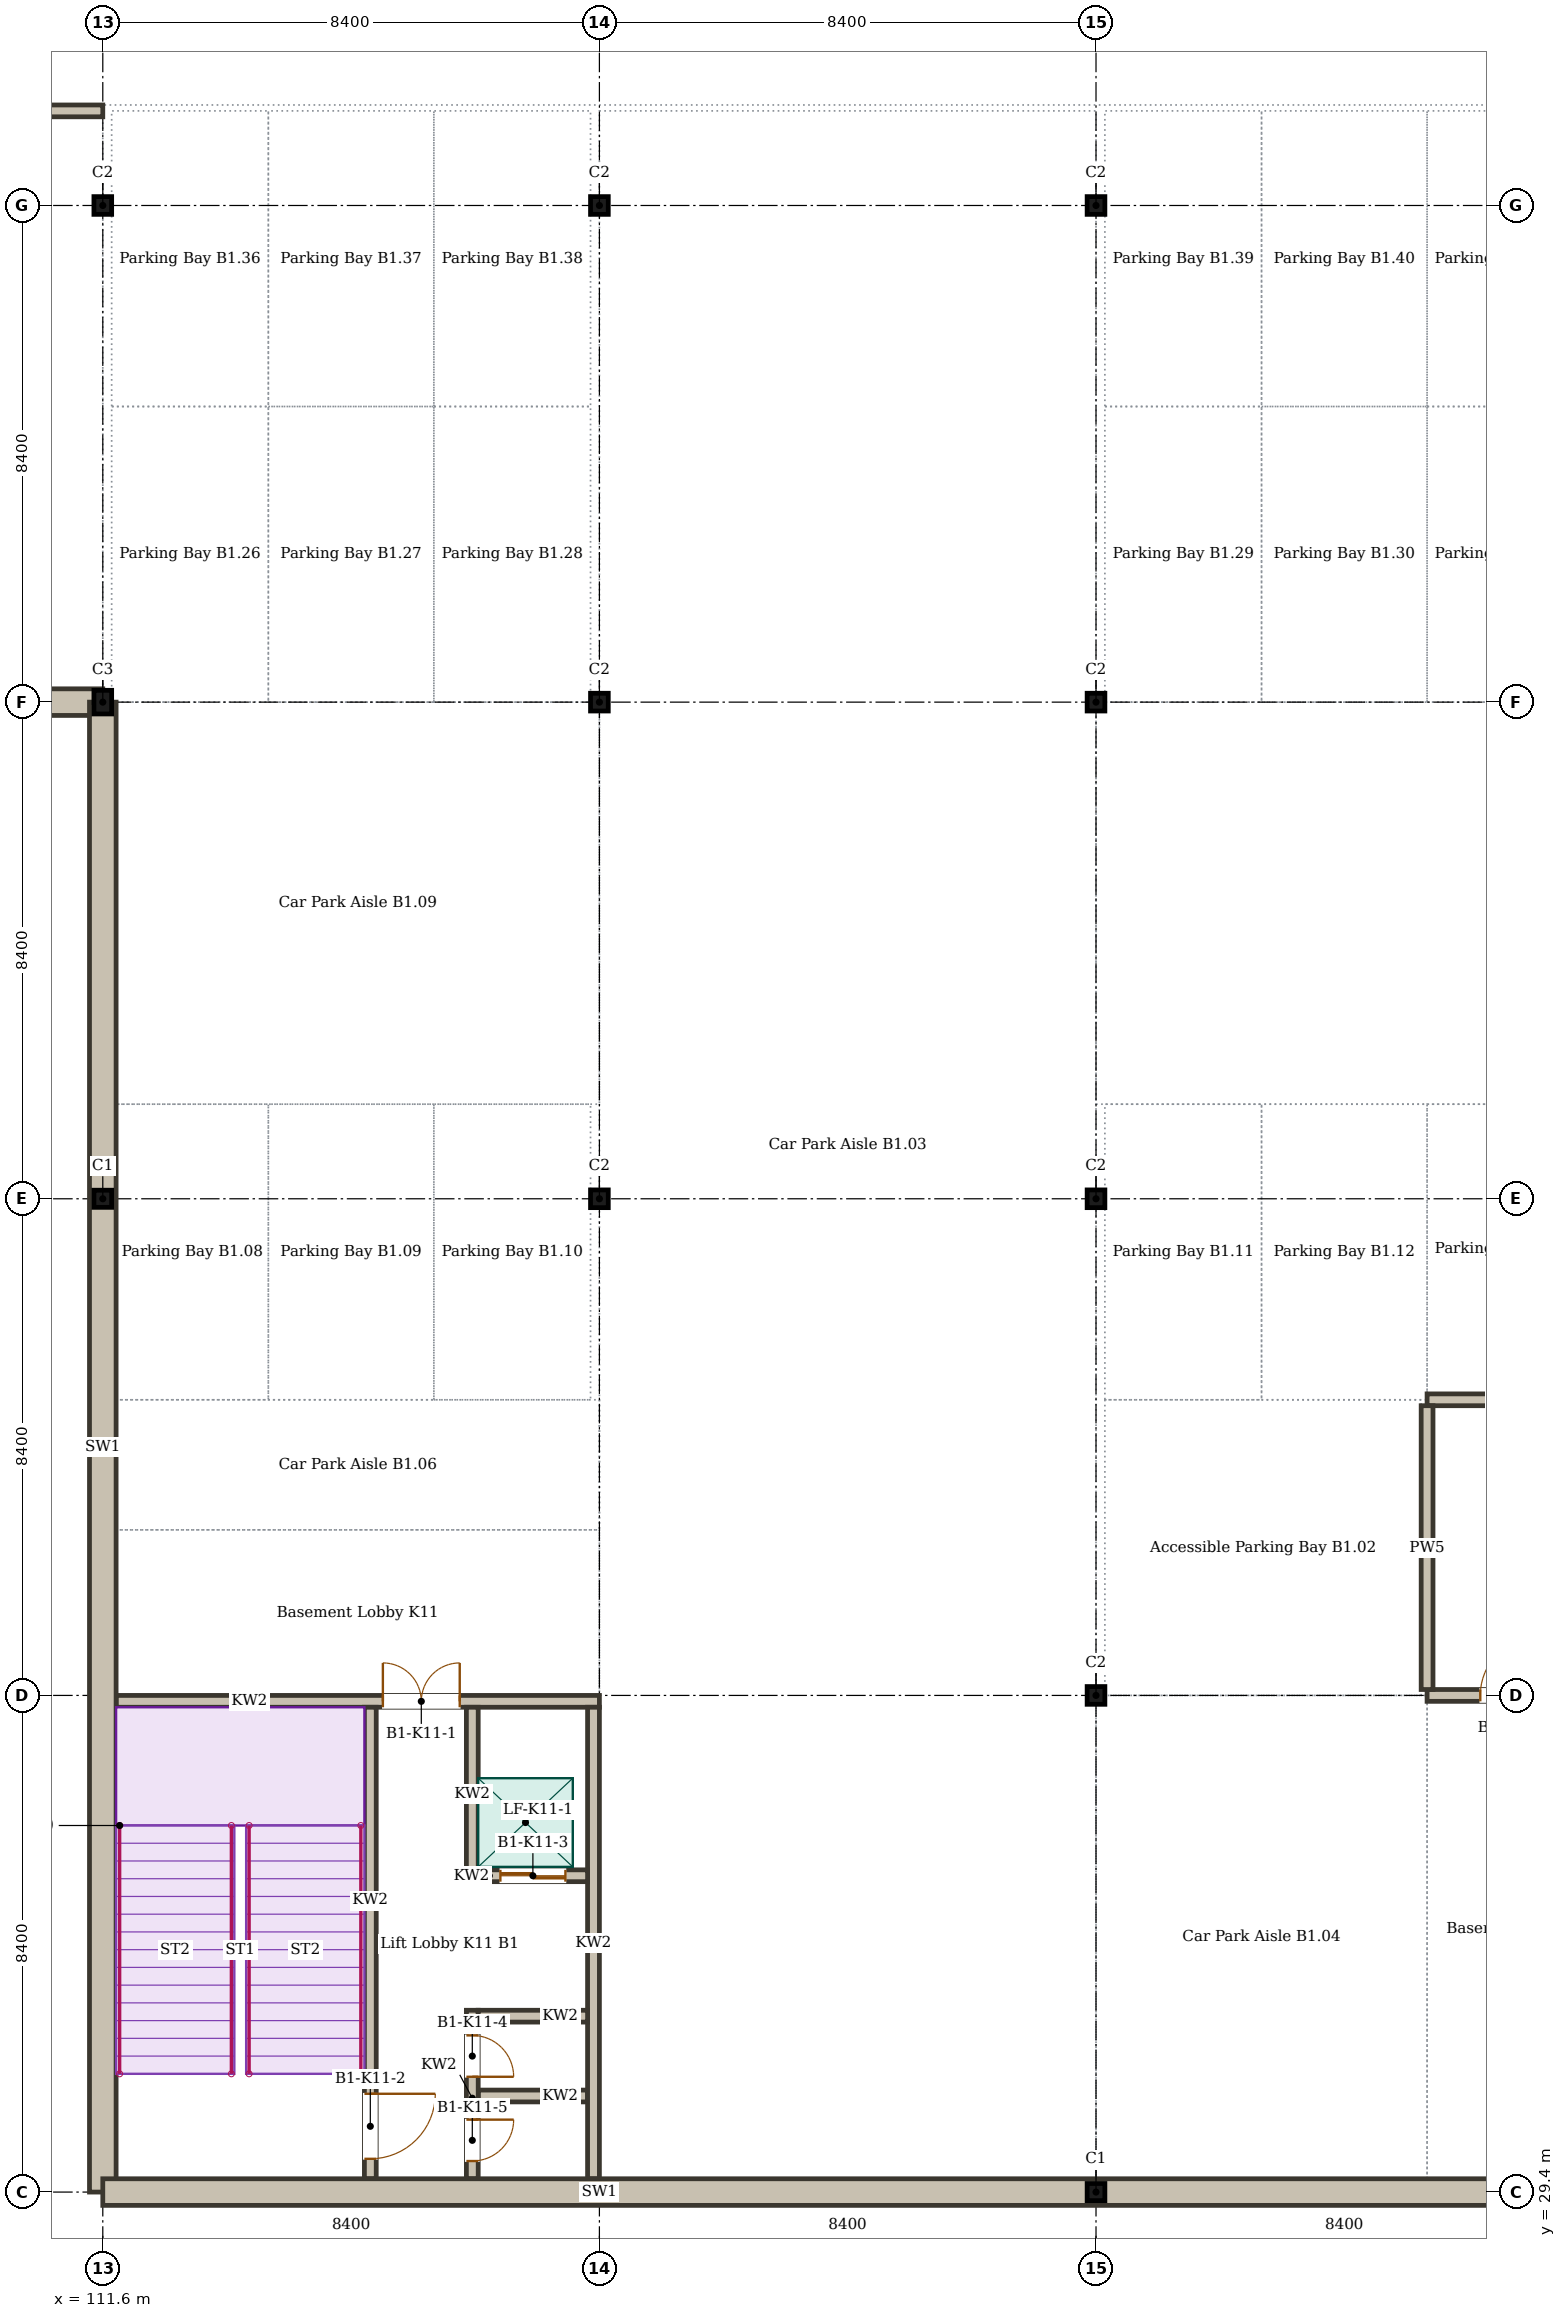
"""IFC4 building model, lengths in metres.
Left out: names, types, materials, properties, quantities, classifications, styles, units other than length and angle.
Written with IfcOpenShell. Run it as: python <this file> out.ifc"""

import sys

from ifc_helpers import new_model, si_unit, direction, frame, frame_2d, origin, origin_2d, place, context, subcontext, project, spatial, rectangle, i_section, extrude, element, fill, save


model = new_model("IFC4")
c1 = context("Model", 3, precision=1e-05, world=origin(), true_north=direction((0.0, 1.0)))
c2 = subcontext(c1, "Body", "Model", "MODEL_VIEW")
j1 = project(units=[si_unit("LENGTHUNIT", "METRE"), si_unit("PLANEANGLEUNIT", "RADIAN")], contexts=[c1])
p1 = place(None, origin())
s1 = spatial("IfcSite", under=j1, at=p1, CompositionType="ELEMENT")
p2 = place(p1, origin())
s2 = spatial("IfcBuilding", under=s1, at=p2, CompositionType="ELEMENT")
p3 = place(p2, frame((0.0, 0.0, -4.5)))
s3 = spatial("IfcBuildingStorey", under=s2, at=p3, CompositionType="ELEMENT", Elevation=-4.5)
p4 = place(p3, frame((128.4, 29.4, 0.0), z_axis=(0.0, 0.0, 1.0), x_axis=(1.0, 0.0, 0.0)))
e1 = element("IfcColumn", 1, at=p4, inside=s3, PredefinedType="COLUMN", context=c2, shape_type="SweptSolid", body=[
    extrude(i_section(OverallWidth=0.3, OverallDepth=0.29, WebThickness=0.009, FlangeThickness=0.014, FilletRadius=0.027, at=origin_2d()), origin(), (0.0, 0.0, 1.0), 4.5),
])
p5 = place(p3, frame((128.4, 37.8, 0.0), z_axis=(0.0, 0.0, 1.0), x_axis=(1.0, 0.0, 0.0)))
e2 = element("IfcColumn", 2, at=p5, inside=s3, PredefinedType="COLUMN", context=c2, shape_type="SweptSolid", body=[
    extrude(i_section(OverallWidth=0.3, OverallDepth=0.3, WebThickness=0.011, FlangeThickness=0.019, FilletRadius=0.027, at=origin_2d()), origin(), (0.0, 0.0, 1.0), 4.5),
])
p6 = place(p3, frame((111.6, 46.2, 0.0), z_axis=(0.0, 0.0, 1.0), x_axis=(1.0, 0.0, 0.0)))
e3 = element("IfcColumn", 3, at=p6, inside=s3, PredefinedType="COLUMN", context=c2, shape_type="SweptSolid", body=[
    extrude(i_section(OverallWidth=0.3, OverallDepth=0.29, WebThickness=0.009, FlangeThickness=0.014, FilletRadius=0.027, at=origin_2d()), origin(), (0.0, 0.0, 1.0), 4.5),
])
for number, where, z_axis, x_axis in (
    (4, (120.0, 46.2, 0.0), (0.0, 0.0, 1.0), (1.0, 0.0, 0.0)),
    (5, (128.4, 46.2, 0.0), (0.0, 0.0, 1.0), (1.0, 0.0, 0.0)),
):
    element("IfcColumn", number, at=place(p3, frame(where, z_axis=z_axis, x_axis=x_axis)), inside=s3, PredefinedType="COLUMN", context=c2, shape_type="SweptSolid", body=[
        extrude(i_section(OverallWidth=0.3, OverallDepth=0.3, WebThickness=0.011, FlangeThickness=0.019, FilletRadius=0.027, at=origin_2d()), origin(), (0.0, 0.0, 1.0), 4.5),
    ])
p7 = place(p3, frame((111.6, 54.6, 0.0), z_axis=(0.0, 0.0, 1.0), x_axis=(1.0, 0.0, 0.0)))
e6 = element("IfcColumn", 6, at=p7, inside=s3, PredefinedType="COLUMN", context=c2, shape_type="SweptSolid", body=[
    extrude(i_section(OverallWidth=0.3, OverallDepth=0.4, WebThickness=0.013, FlangeThickness=0.024, FilletRadius=0.027, at=origin_2d()), origin(), (0.0, 0.0, 1.0), 4.5),
])
for number, where, z_axis, x_axis in (
    (7, (120.0, 54.6, 0.0), (0.0, 0.0, 1.0), (1.0, 0.0, 0.0)),
    (8, (128.4, 54.6, 0.0), (0.0, 0.0, 1.0), (1.0, 0.0, 0.0)),
    (9, (111.6, 63.0, 0.0), (0.0, 0.0, 1.0), (1.0, 0.0, 0.0)),
    (10, (120.0, 63.0, 0.0), (0.0, 0.0, 1.0), (1.0, 0.0, 0.0)),
    (11, (128.4, 63.0, 0.0), (0.0, 0.0, 1.0), (1.0, 0.0, 0.0)),
):
    element("IfcColumn", number, at=place(p3, frame(where, z_axis=z_axis, x_axis=x_axis)), inside=s3, PredefinedType="COLUMN", context=c2, shape_type="SweptSolid", body=[
        extrude(i_section(OverallWidth=0.3, OverallDepth=0.3, WebThickness=0.011, FlangeThickness=0.019, FilletRadius=0.027, at=origin_2d()), origin(), (0.0, 0.0, 1.0), 4.5),
    ])
p8 = place(p3, frame((44.4, 54.6, 0.0), z_axis=(0.0, 0.0, 1.0), x_axis=(1.0, 0.0, 0.0)))
e12 = element("IfcWall", 12, at=p8, inside=s3, PredefinedType="SOLIDWALL", context=c2, shape_type="SweptSolid", body=[
    extrude(rectangle(XDim=67.2, YDim=0.45, at=frame_2d((33.6, 0.0))), origin(), (0.0, 0.0, 1.0), 4.35),
])
p9 = place(p3, frame((111.6, 54.6, 0.0), z_axis=(0.0, 0.0, 1.0), x_axis=(0.0, -1.0, 0.0)))
e13 = element("IfcWall", 13, at=p9, inside=s3, PredefinedType="SOLIDWALL", context=c2, shape_type="SweptSolid", body=[
    extrude(rectangle(XDim=25.2, YDim=0.45, at=frame_2d((12.6, 0.0))), origin(), (0.0, 0.0, 1.0), 4.35),
])
p10 = place(p3, frame((111.6, 29.4, 0.0), z_axis=(0.0, 0.0, 1.0), x_axis=(1.0, 0.0, 0.0)))
e14 = element("IfcWall", 14, at=p10, inside=s3, PredefinedType="SOLIDWALL", context=c2, shape_type="SweptSolid", body=[
    extrude(rectangle(XDim=33.6, YDim=0.45, at=frame_2d((16.8, 0.0))), origin(), (0.0, 0.0, 1.0), 4.35),
])
p11 = place(p3, frame((134.0, 37.8, 0.0), z_axis=(0.0, 0.0, 1.0), x_axis=(1.0, 0.0, 0.0)))
e15 = element("IfcWall", 15, at=p11, inside=s3, PredefinedType="SOLIDWALL", context=c2, shape_type="SweptSolid", body=[
    extrude(rectangle(XDim=2.8, YDim=0.2, at=frame_2d((1.4, 0.0))), origin(), (0.0, 0.0, 1.0), 3.8),
])
p12 = place(p11, frame((0.9, 0.0, 0.0)))
e16 = element("IfcOpeningElement", 16, at=p12, cuts=e15, PredefinedType="OPENING", context=c2, shape_type="SweptSolid", body=[
    extrude(rectangle(XDim=1.0, YDim=2.1, at=frame_2d((0.5, 1.05))), frame((0.0, 0.11, 0.0), z_axis=(0.0, -1.0, 0.0), x_axis=(1.0, 0.0, 0.0)), (0.0, 0.0, 1.0), 0.22),
])
p13 = place(p3, frame((134.0, 42.8, 0.0), z_axis=(0.0, 0.0, 1.0), x_axis=(1.0, 0.0, 0.0)))
e17 = element("IfcWall", 17, at=p13, inside=s3, PredefinedType="SOLIDWALL", context=c2, shape_type="SweptSolid", body=[
    extrude(rectangle(XDim=2.65, YDim=0.2, at=frame_2d((1.325, 0.0))), origin(), (0.0, 0.0, 1.0), 3.95),
])
p14 = place(p3, frame((44.4, 64.6, 0.0), z_axis=(0.0, 0.0, 1.0), x_axis=(1.0, 0.0, 0.0)))
e18 = element("IfcWall", 18, at=p14, inside=s3, PredefinedType="SOLIDWALL", context=c2, shape_type="SweptSolid", body=[
    extrude(rectangle(XDim=67.2, YDim=0.2, at=frame_2d((33.6, 0.0))), origin(), (0.0, 0.0, 1.0), 3.8),
])
p15 = place(p14, frame((3.2, 0.0, 0.0)))
e19 = element("IfcOpeningElement", 19, at=p15, cuts=e18, PredefinedType="OPENING", context=c2, shape_type="SweptSolid", body=[
    extrude(rectangle(XDim=1.0, YDim=2.1, at=frame_2d((0.5, 1.05))), frame((0.0, 0.11, 0.0), z_axis=(0.0, -1.0, 0.0), x_axis=(1.0, 0.0, 0.0)), (0.0, 0.0, 1.0), 0.22),
])
p16 = place(p14, frame((21.0, 0.0, 0.0)))
e20 = element("IfcOpeningElement", 20, at=p16, cuts=e18, PredefinedType="OPENING", context=c2, shape_type="SweptSolid", body=[
    extrude(rectangle(XDim=1.0, YDim=2.1, at=frame_2d((0.5, 1.05))), frame((0.0, 0.11, 0.0), z_axis=(0.0, -1.0, 0.0), x_axis=(1.0, 0.0, 0.0)), (0.0, 0.0, 1.0), 0.22),
])
p17 = place(p14, frame((28.9, 0.0, 0.0)))
e21 = element("IfcOpeningElement", 21, at=p17, cuts=e18, PredefinedType="OPENING", context=c2, shape_type="SweptSolid", body=[
    extrude(rectangle(XDim=1.0, YDim=2.1, at=frame_2d((0.5, 1.05))), frame((0.0, 0.11, 0.0), z_axis=(0.0, -1.0, 0.0), x_axis=(1.0, 0.0, 0.0)), (0.0, 0.0, 1.0), 0.22),
])
p18 = place(p14, frame((36.8, 0.0, 0.0)))
e22 = element("IfcOpeningElement", 22, at=p18, cuts=e18, PredefinedType="OPENING", context=c2, shape_type="SweptSolid", body=[
    extrude(rectangle(XDim=1.0, YDim=2.1, at=frame_2d((0.5, 1.05))), frame((0.0, 0.11, 0.0), z_axis=(0.0, -1.0, 0.0), x_axis=(1.0, 0.0, 0.0)), (0.0, 0.0, 1.0), 0.22),
])
p19 = place(p14, frame((54.5, 0.0, 0.0)))
e23 = element("IfcOpeningElement", 23, at=p19, cuts=e18, PredefinedType="OPENING", context=c2, shape_type="SweptSolid", body=[
    extrude(rectangle(XDim=1.0, YDim=2.1, at=frame_2d((0.5, 1.05))), frame((0.0, 0.11, 0.0), z_axis=(0.0, -1.0, 0.0), x_axis=(1.0, 0.0, 0.0)), (0.0, 0.0, 1.0), 0.22),
])
p20 = place(p14, frame((62.5, 0.0, 0.0)))
e24 = element("IfcOpeningElement", 24, at=p20, cuts=e18, PredefinedType="OPENING", context=c2, shape_type="SweptSolid", body=[
    extrude(rectangle(XDim=1.0, YDim=2.1, at=frame_2d((0.5, 1.05))), frame((0.0, 0.11, 0.0), z_axis=(0.0, -1.0, 0.0), x_axis=(1.0, 0.0, 0.0)), (0.0, 0.0, 1.0), 0.22),
])
p21 = place(p3, frame((134.0, 37.9, 0.0), z_axis=(0.0, 0.0, 1.0), x_axis=(0.0, 1.0, 0.0)))
e25 = element("IfcWall", 25, at=p21, inside=s3, PredefinedType="SOLIDWALL", context=c2, shape_type="SweptSolid", body=[
    extrude(rectangle(XDim=4.8, YDim=0.2, at=frame_2d((2.4, 0.0))), origin(), (0.0, 0.0, 1.0), 3.8),
])
p22 = place(p3, frame((111.825, 37.7, 0.0), z_axis=(0.0, 0.0, 1.0), x_axis=(1.0, 0.0, 0.0)))
e26 = element("IfcWall", 26, at=p22, inside=s3, PredefinedType="SOLIDWALL", context=c2, shape_type="SweptSolid", body=[
    extrude(rectangle(XDim=8.175, YDim=0.2, at=frame_2d((4.087, 0.0))), origin(), (0.0, 0.0, 1.0), 4.5),
])
p23 = place(p22, frame((4.512, 0.0, 0.0)))
e27 = element("IfcOpeningElement", 27, at=p23, cuts=e26, PredefinedType="OPENING", context=c2, shape_type="SweptSolid", body=[
    extrude(rectangle(XDim=1.3, YDim=2.1, at=frame_2d((0.65, 1.05))), frame((0.0, 0.11, 0.0), z_axis=(0.0, -1.0, 0.0), x_axis=(1.0, 0.0, 0.0)), (0.0, 0.0, 1.0), 0.22),
])
p24 = place(p3, frame((119.9, 37.6, 0.0), z_axis=(0.0, 0.0, 1.0), x_axis=(0.0, -1.0, 0.0)))
e28 = element("IfcWall", 28, at=p24, inside=s3, PredefinedType="SOLIDWALL", context=c2, shape_type="SweptSolid", body=[
    extrude(rectangle(XDim=7.975, YDim=0.2, at=frame_2d((3.988, 0.0))), origin(), (0.0, 0.0, 1.0), 4.5),
])
p25 = place(p3, frame((116.125, 37.6, 0.0), z_axis=(0.0, 0.0, 1.0), x_axis=(0.0, -1.0, 0.0)))
e29 = element("IfcWall", 29, at=p25, inside=s3, PredefinedType="SOLIDWALL", context=c2, shape_type="SweptSolid", body=[
    extrude(rectangle(XDim=7.975, YDim=0.2, at=frame_2d((3.988, 0.0))), origin(), (0.0, 0.0, 1.0), 4.5),
])
p26 = place(p25, frame((6.538, 0.0, 0.0)))
e30 = element("IfcOpeningElement", 30, at=p26, cuts=e29, PredefinedType="OPENING", context=c2, shape_type="SweptSolid", body=[
    extrude(rectangle(XDim=1.1, YDim=2.1, at=frame_2d((0.55, 1.05))), frame((0.0, 0.11, 0.0), z_axis=(0.0, -1.0, 0.0), x_axis=(1.0, 0.0, 0.0)), (0.0, 0.0, 1.0), 0.22),
])
p27 = place(p3, frame((117.85, 37.6, 0.0), z_axis=(0.0, 0.0, 1.0), x_axis=(0.0, -1.0, 0.0)))
e31 = element("IfcWall", 31, at=p27, inside=s3, PredefinedType="SOLIDWALL", context=c2, shape_type="SweptSolid", body=[
    extrude(rectangle(XDim=2.95, YDim=0.2, at=frame_2d((1.475, 0.0))), origin(), (0.0, 0.0, 1.0), 4.5),
])
p28 = place(p3, frame((117.85, 32.475, 0.0), z_axis=(0.0, 0.0, 1.0), x_axis=(0.0, -1.0, 0.0)))
e32 = element("IfcWall", 32, at=p28, inside=s3, PredefinedType="SOLIDWALL", context=c2, shape_type="SweptSolid", body=[
    extrude(rectangle(XDim=2.85, YDim=0.2, at=frame_2d((1.425, 0.0))), origin(), (0.0, 0.0, 1.0), 4.35),
])
p29 = place(p28, frame((0.425, 0.0, 0.0)))
e33 = element("IfcOpeningElement", 33, at=p29, cuts=e32, PredefinedType="OPENING", context=c2, shape_type="SweptSolid", body=[
    extrude(rectangle(XDim=0.7, YDim=2.1, at=frame_2d((0.35, 1.05))), frame((0.0, 0.11, 0.0), z_axis=(0.0, -1.0, 0.0), x_axis=(1.0, 0.0, 0.0)), (0.0, 0.0, 1.0), 0.22),
])
p30 = place(p28, frame((1.85, 0.0, 0.0)))
e34 = element("IfcOpeningElement", 34, at=p30, cuts=e32, PredefinedType="OPENING", context=c2, shape_type="SweptSolid", body=[
    extrude(rectangle(XDim=0.7, YDim=2.1, at=frame_2d((0.35, 1.05))), frame((0.0, 0.11, 0.0), z_axis=(0.0, -1.0, 0.0), x_axis=(1.0, 0.0, 0.0)), (0.0, 0.0, 1.0), 0.22),
])
p31 = place(p3, frame((117.95, 34.75, 0.0), z_axis=(0.0, 0.0, 1.0), x_axis=(1.0, 0.0, 0.0)))
e35 = element("IfcWall", 35, at=p31, inside=s3, PredefinedType="SOLIDWALL", context=c2, shape_type="SweptSolid", body=[
    extrude(rectangle(XDim=1.85, YDim=0.2, at=frame_2d((0.925, 0.0))), origin(), (0.0, 0.0, 1.0), 4.5),
])
p32 = place(p31, frame((0.375, 0.0, 0.0)))
e36 = element("IfcOpeningElement", 36, at=p32, cuts=e35, PredefinedType="OPENING", context=c2, shape_type="SweptSolid", body=[
    extrude(rectangle(XDim=1.1, YDim=2.1, at=frame_2d((0.55, 1.05))), frame((0.0, 0.11, 0.0), z_axis=(0.0, -1.0, 0.0), x_axis=(1.0, 0.0, 0.0)), (0.0, 0.0, 1.0), 0.22),
])
for number, where, z_axis, x_axis in (
    (37, (117.95, 32.375, 0.0), (0.0, 0.0, 1.0), (1.0, 0.0, 0.0)),
    (38, (117.95, 31.025, 0.0), (0.0, 0.0, 1.0), (1.0, 0.0, 0.0)),
):
    element("IfcWall", number, at=place(p3, frame(where, z_axis=z_axis, x_axis=x_axis)), inside=s3, PredefinedType="SOLIDWALL", context=c2, shape_type="SweptSolid", body=[
        extrude(rectangle(XDim=1.85, YDim=0.2, at=frame_2d((0.925, 0.0))), origin(), (0.0, 0.0, 1.0), 4.35),
    ])
p33 = place(p12, origin())
e39 = element("IfcDoor", 39, at=p33, inside=s3, OperationType="SINGLE_SWING_RIGHT", PredefinedType="DOOR", context=c2, shape_type="SweptSolid", body=[
    extrude(rectangle(XDim=1.0, YDim=2.1, at=frame_2d((0.5, 1.05))), frame((0.0, 0.025, 0.0), z_axis=(0.0, -1.0, 0.0), x_axis=(1.0, 0.0, 0.0)), (0.0, 0.0, 1.0), 0.05),
])
fill(e16, e39)
p34 = place(p23, origin())
e40 = element("IfcDoor", 40, at=p34, inside=s3, OperationType="DOUBLE_DOOR_DOUBLE_SWING", PredefinedType="DOOR", context=c2, shape_type="SweptSolid", body=[
    extrude(rectangle(XDim=1.3, YDim=2.1, at=frame_2d((0.65, 1.05))), frame((0.0, 0.025, 0.0), z_axis=(0.0, -1.0, 0.0), x_axis=(1.0, 0.0, 0.0)), (0.0, 0.0, 1.0), 0.05),
])
fill(e27, e40)
p35 = place(p26, origin())
e41 = element("IfcDoor", 41, at=p35, inside=s3, OperationType="SINGLE_SWING_LEFT", PredefinedType="DOOR", context=c2, shape_type="SweptSolid", body=[
    extrude(rectangle(XDim=1.1, YDim=2.1, at=frame_2d((0.55, 1.05))), frame((0.0, 0.025, 0.0), z_axis=(0.0, -1.0, 0.0), x_axis=(1.0, 0.0, 0.0)), (0.0, 0.0, 1.0), 0.05),
])
fill(e30, e41)
p36 = place(p32, origin())
e42 = element("IfcDoor", 42, at=p36, inside=s3, OperationType="DOUBLE_DOOR_SLIDING", PredefinedType="DOOR", context=c2, shape_type="SweptSolid", body=[
    extrude(rectangle(XDim=1.1, YDim=2.1, at=frame_2d((0.55, 1.05))), frame((0.0, 0.025, 0.0), z_axis=(0.0, -1.0, 0.0), x_axis=(1.0, 0.0, 0.0)), (0.0, 0.0, 1.0), 0.05),
])
fill(e36, e42)
p37 = place(p29, origin())
e43 = element("IfcDoor", 43, at=p37, inside=s3, OperationType="SINGLE_SWING_RIGHT", PredefinedType="DOOR", context=c2, shape_type="SweptSolid", body=[
    extrude(rectangle(XDim=0.7, YDim=2.1, at=frame_2d((0.35, 1.05))), frame((0.0, 0.025, 0.0), z_axis=(0.0, -1.0, 0.0), x_axis=(1.0, 0.0, 0.0)), (0.0, 0.0, 1.0), 0.05),
])
fill(e33, e43)
p38 = place(p30, origin())
e44 = element("IfcDoor", 44, at=p38, inside=s3, OperationType="SINGLE_SWING_LEFT", PredefinedType="DOOR", context=c2, shape_type="SweptSolid", body=[
    extrude(rectangle(XDim=0.7, YDim=2.1, at=frame_2d((0.35, 1.05))), frame((0.0, 0.025, 0.0), z_axis=(0.0, -1.0, 0.0), x_axis=(1.0, 0.0, 0.0)), (0.0, 0.0, 1.0), 0.05),
])
fill(e34, e44)
save(model, sys.argv[1])
